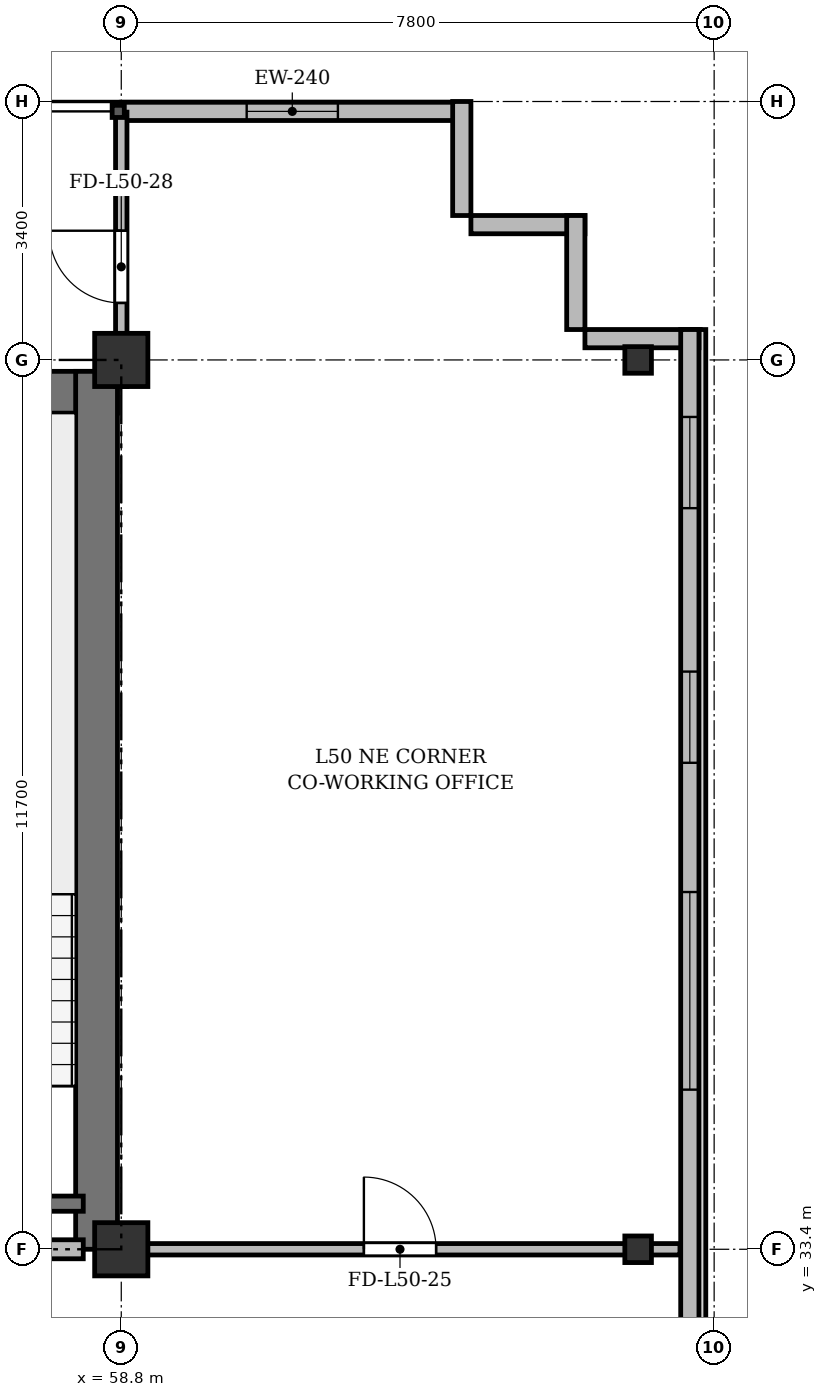
"""IFC4 building model, lengths in metres.
Left out: names, types, materials, properties, quantities, classifications, styles, units other than length and angle.
Written with IfcOpenShell. Run it as: python <this file> out.ifc"""

import sys

from ifc_helpers import new_model, si_unit, direction, frame, frame_2d, origin, origin_2d, place, context, subcontext, project, spatial, rectangle, i_section, extrude, source, transform, mapped, element, fill, save


model = new_model("IFC4")
c1 = context("Model", 3, precision=1e-05, world=origin(), true_north=direction((0.0, 1.0)))
c2 = subcontext(c1, "Body", "Model", "MODEL_VIEW")
j1 = project(units=[si_unit("LENGTHUNIT", "METRE"), si_unit("PLANEANGLEUNIT", "RADIAN")], contexts=[c1])
p1 = place(None, origin())
s1 = spatial("IfcSite", under=j1, at=p1, CompositionType="ELEMENT")
p2 = place(p1, origin())
s2 = spatial("IfcBuilding", under=s1, at=p2, CompositionType="ELEMENT")
p3 = place(p2, frame((0.0, 0.0, 194.1)))
s3 = spatial("IfcBuildingStorey", under=s2, at=p3, CompositionType="ELEMENT", Elevation=194.1)
m1 = source(origin(), c2, "Body", "SweptSolid", [
    extrude(rectangle(XDim=0.7, YDim=0.7, at=origin_2d()), origin(), (0.0, 0.0, 1.0), 3.6),
])
for number, where, z_axis, x_axis in (
    (1, (58.8, 33.4, 0.0), (0.0, 0.0, 1.0), (1.0, 0.0, 0.0)),
    (2, (58.8, 45.1, 0.0), (0.0, 0.0, 1.0), (1.0, 0.0, 0.0)),
):
    element("IfcColumn", number, at=place(p3, frame(where, z_axis=z_axis, x_axis=x_axis)), inside=s3, PredefinedType="COLUMN", context=c2, shape_type="MappedRepresentation", body=[
        mapped(m1, transform((0.0, 0.0, 0.0), x_axis=(1.0, 0.0, 0.0), y_axis=(0.0, 1.0, 0.0), z_axis=(0.0, 0.0, 1.0), scale=1.0)),
    ])
m2 = source(origin(), c2, "Body", "SweptSolid", [
    extrude(i_section(OverallWidth=0.35, OverallDepth=0.35, WebThickness=0.018, FlangeThickness=0.028, at=origin_2d()), origin(), (0.0, 0.0, 1.0), 3.6),
])
for number, where, z_axis, x_axis in (
    (3, (65.6, 33.4, 0.0), (0.0, 0.0, 1.0), (1.0, 0.0, 0.0)),
    (4, (65.6, 45.1, 0.0), (0.0, 0.0, 1.0), (1.0, 0.0, 0.0)),
):
    element("IfcColumn", number, at=place(p3, frame(where, z_axis=z_axis, x_axis=x_axis)), inside=s3, PredefinedType="COLUMN", context=c2, shape_type="MappedRepresentation", body=[
        mapped(m2, transform((0.0, 0.0, 0.0), x_axis=(1.0, 0.0, 0.0), y_axis=(0.0, 1.0, 0.0), z_axis=(0.0, 0.0, 1.0), scale=1.0)),
    ])
p4 = place(p3, frame((58.8, 48.37, 0.0), z_axis=(0.0, 0.0, 1.0), x_axis=(1.0, 0.0, 0.0)))
e5 = element("IfcWall", 5, at=p4, inside=s3, PredefinedType="SOLIDWALL", context=c2, shape_type="SweptSolid", body=[
    extrude(rectangle(XDim=4.5, YDim=0.24, at=frame_2d((2.25, 0.0))), origin(), (0.0, 0.0, 1.0), 3.36),
])
p5 = place(p4, frame((1.65, 0.0, 0.9)))
e6 = element("IfcOpeningElement", 6, at=p5, cuts=e5, PredefinedType="OPENING", context=c2, shape_type="SweptSolid", body=[
    extrude(rectangle(XDim=1.2, YDim=1.65, at=frame_2d((0.6, 0.825))), frame((0.0, 0.13, 0.0), z_axis=(0.0, -1.0, 0.0), x_axis=(1.0, 0.0, 0.0)), (0.0, 0.0, 1.0), 0.26),
])
for number, where, z_axis, x_axis in (
    (7, (63.28, 48.5, 0.0), (0.0, 0.0, 1.0), (0.0, -1.0, 0.0)),
    (8, (63.4, 46.88, 0.0), (0.0, 0.0, 1.0), (1.0, 0.0, 0.0)),
    (9, (64.78, 47.0, 0.0), (0.0, 0.0, 1.0), (0.0, -1.0, 0.0)),
    (10, (64.9, 45.38, 0.0), (0.0, 0.0, 1.0), (1.0, 0.0, 0.0)),
):
    element("IfcWall", number, at=place(p3, frame(where, z_axis=z_axis, x_axis=x_axis)), inside=s3, PredefinedType="SOLIDWALL", context=c2, shape_type="SweptSolid", body=[
        extrude(rectangle(XDim=1.5, YDim=0.24, at=frame_2d((0.75, 0.0))), origin(), (0.0, 0.0, 1.0), 3.36),
    ])
p6 = place(p3, frame((66.28, 45.5, 0.0), z_axis=(0.0, 0.0, 1.0), x_axis=(0.0, -1.0, 0.0)))
e11 = element("IfcWall", 11, at=p6, inside=s3, PredefinedType="SOLIDWALL", context=c2, shape_type="SweptSolid", body=[
    extrude(rectangle(XDim=39.1, YDim=0.24, at=frame_2d((19.55, 0.0))), origin(), (0.0, 0.0, 1.0), 3.36),
])
p7 = place(p6, frame((36.45, 0.0, 0.92)))
e12 = element("IfcOpeningElement", 12, at=p7, cuts=e11, PredefinedType="OPENING", context=c2, shape_type="SweptSolid", body=[
    extrude(rectangle(XDim=1.2, YDim=1.65, at=frame_2d((0.6, 0.825))), frame((0.0, 0.13, 0.0), z_axis=(0.0, -1.0, 0.0), x_axis=(1.0, 0.0, 0.0)), (0.0, 0.0, 1.0), 0.26),
])
p8 = place(p6, frame((32.8, 0.0, 0.92)))
e13 = element("IfcOpeningElement", 13, at=p8, cuts=e11, PredefinedType="OPENING", context=c2, shape_type="SweptSolid", body=[
    extrude(rectangle(XDim=2.6, YDim=1.9, at=frame_2d((1.3, 0.95))), frame((0.0, 0.13, 0.0), z_axis=(0.0, -1.0, 0.0), x_axis=(1.0, 0.0, 0.0)), (0.0, 0.0, 1.0), 0.26),
])
p9 = place(p6, frame((28.6, 0.0, 0.92)))
e14 = element("IfcOpeningElement", 14, at=p9, cuts=e11, PredefinedType="OPENING", context=c2, shape_type="SweptSolid", body=[
    extrude(rectangle(XDim=2.6, YDim=1.9, at=frame_2d((1.3, 0.95))), frame((0.0, 0.13, 0.0), z_axis=(0.0, -1.0, 0.0), x_axis=(1.0, 0.0, 0.0)), (0.0, 0.0, 1.0), 0.26),
])
p10 = place(p6, frame((21.4, 0.0, 0.92)))
e15 = element("IfcOpeningElement", 15, at=p10, cuts=e11, PredefinedType="OPENING", context=c2, shape_type="SweptSolid", body=[
    extrude(rectangle(XDim=2.6, YDim=1.9, at=frame_2d((1.3, 0.95))), frame((0.0, 0.13, 0.0), z_axis=(0.0, -1.0, 0.0), x_axis=(1.0, 0.0, 0.0)), (0.0, 0.0, 1.0), 0.26),
])
p11 = place(p6, frame((7.4, 0.0, 0.92)))
e16 = element("IfcOpeningElement", 16, at=p11, cuts=e11, PredefinedType="OPENING", context=c2, shape_type="SweptSolid", body=[
    extrude(rectangle(XDim=2.6, YDim=1.9, at=frame_2d((1.3, 0.95))), frame((0.0, 0.13, 0.0), z_axis=(0.0, -1.0, 0.0), x_axis=(1.0, 0.0, 0.0)), (0.0, 0.0, 1.0), 0.26),
])
p12 = place(p6, frame((4.5, 0.0, 0.92)))
e17 = element("IfcOpeningElement", 17, at=p12, cuts=e11, PredefinedType="OPENING", context=c2, shape_type="SweptSolid", body=[
    extrude(rectangle(XDim=1.2, YDim=1.65, at=frame_2d((0.6, 0.825))), frame((0.0, 0.13, 0.0), z_axis=(0.0, -1.0, 0.0), x_axis=(1.0, 0.0, 0.0)), (0.0, 0.0, 1.0), 0.26),
])
p13 = place(p6, frame((1.15, 0.0, 0.92)))
e18 = element("IfcOpeningElement", 18, at=p13, cuts=e11, PredefinedType="OPENING", context=c2, shape_type="SweptSolid", body=[
    extrude(rectangle(XDim=1.2, YDim=1.65, at=frame_2d((0.6, 0.825))), frame((0.0, 0.13, 0.0), z_axis=(0.0, -1.0, 0.0), x_axis=(1.0, 0.0, 0.0)), (0.0, 0.0, 1.0), 0.26),
])
p14 = place(p3, frame((15.65, 44.675, 0.0), z_axis=(0.0, 0.0, 1.0), x_axis=(1.0, 0.0, 0.0)))
e19 = element("IfcWall", 19, at=p14, inside=s3, PredefinedType="SHEAR", context=c2, shape_type="SweptSolid", body=[
    extrude(rectangle(XDim=43.1, YDim=0.55, at=frame_2d((21.55, 0.0))), origin(), (0.0, 0.0, 1.0), 3.36),
])
p15 = place(p3, frame((58.475, 33.4, 0.0), z_axis=(0.0, 0.0, 1.0), x_axis=(0.0, 1.0, 0.0)))
e20 = element("IfcWall", 20, at=p15, inside=s3, PredefinedType="SHEAR", context=c2, shape_type="SweptSolid", body=[
    extrude(rectangle(XDim=11.55, YDim=0.55, at=frame_2d((5.775, 0.0))), origin(), (0.0, 0.0, 1.0), 3.36),
])
p16 = place(p3, frame((54.9, 34.0, 0.0), z_axis=(0.0, 0.0, 1.0), x_axis=(1.0, 0.0, 0.0)))
e21 = element("IfcWall", 21, at=p16, inside=s3, PredefinedType="SHEAR", context=c2, shape_type="SweptSolid", body=[
    extrude(rectangle(XDim=3.4, YDim=0.2, at=frame_2d((1.7, 0.0))), origin(), (0.0, 0.0, 1.0), 3.36),
])
p17 = place(p3, frame((47.15, 33.4, 0.0), z_axis=(0.0, 0.0, 1.0), x_axis=(1.0, 0.0, 0.0)))
e22 = element("IfcWall", 22, at=p17, inside=s3, PredefinedType="PARTITIONING", context=c2, shape_type="SweptSolid", body=[
    extrude(rectangle(XDim=11.15, YDim=0.25, at=frame_2d((5.575, 0.0))), origin(), (0.0, 0.0, 1.0), 2.91),
])
p18 = place(p17, frame((0.7, 0.0, 0.0)))
e23 = element("IfcOpeningElement", 23, at=p18, cuts=e22, PredefinedType="OPENING", context=c2, shape_type="SweptSolid", body=[
    extrude(rectangle(XDim=0.95, YDim=2.15, at=frame_2d((0.475, 1.075))), frame((0.0, 0.135, 0.0), z_axis=(0.0, -1.0, 0.0), x_axis=(1.0, 0.0, 0.0)), (0.0, 0.0, 1.0), 0.27),
])
p19 = place(p17, frame((6.0, 0.0, 0.0)))
e24 = element("IfcOpeningElement", 24, at=p19, cuts=e22, PredefinedType="OPENING", context=c2, shape_type="SweptSolid", body=[
    extrude(rectangle(XDim=1.2, YDim=2.15, at=frame_2d((0.6, 1.075))), frame((0.0, 0.135, 0.0), z_axis=(0.0, -1.0, 0.0), x_axis=(1.0, 0.0, 0.0)), (0.0, 0.0, 1.0), 0.27),
])
p20 = place(p3, frame((58.8, 33.4, 0.0), z_axis=(0.0, 0.0, 1.0), x_axis=(1.0, 0.0, 0.0)))
e25 = element("IfcWall", 25, at=p20, inside=s3, PredefinedType="PARTITIONING", context=c2, shape_type="SweptSolid", body=[
    extrude(rectangle(XDim=7.35, YDim=0.15, at=frame_2d((3.675, 0.0))), origin(), (0.0, 0.0, 1.0), 2.91),
])
p21 = place(p20, frame((3.192, 0.0, 0.0)))
e26 = element("IfcOpeningElement", 26, at=p21, cuts=e25, PredefinedType="OPENING", context=c2, shape_type="SweptSolid", body=[
    extrude(rectangle(XDim=0.95, YDim=2.15, at=frame_2d((0.475, 1.075))), frame((0.0, 0.085, 0.0), z_axis=(0.0, -1.0, 0.0), x_axis=(1.0, 0.0, 0.0)), (0.0, 0.0, 1.0), 0.17),
])
p22 = place(p3, frame((58.8, 44.75, 0.0), z_axis=(0.0, 0.0, 1.0), x_axis=(0.0, 1.0, 0.0)))
e27 = element("IfcWall", 27, at=p22, inside=s3, PredefinedType="PARTITIONING", context=c2, shape_type="SweptSolid", body=[
    extrude(rectangle(XDim=3.61, YDim=0.15, at=frame_2d((1.805, 0.0))), origin(), (0.0, 0.0, 1.0), 2.86),
])
p23 = place(p22, frame((1.1, 0.0, 0.0)))
e28 = element("IfcOpeningElement", 28, at=p23, cuts=e27, PredefinedType="OPENING", context=c2, shape_type="SweptSolid", body=[
    extrude(rectangle(XDim=0.95, YDim=2.15, at=frame_2d((0.475, 1.075))), frame((0.0, 0.085, 0.0), z_axis=(0.0, -1.0, 0.0), x_axis=(1.0, 0.0, 0.0)), (0.0, 0.0, 1.0), 0.17),
])
m3 = source(origin(), c2, "Body", "SweptSolid", [
    extrude(rectangle(XDim=1.2, YDim=1.65, at=frame_2d((0.6, 0.825))), frame((0.0, 0.03, 0.0), z_axis=(0.0, -1.0, 0.0), x_axis=(1.0, 0.0, 0.0)), (0.0, 0.0, 1.0), 0.06),
])
p24 = place(p5, origin())
e29 = element("IfcWindow", 29, at=p24, inside=s3, PartitioningType="SINGLE_PANEL", PredefinedType="WINDOW", context=c2, shape_type="MappedRepresentation", body=[
    mapped(m3, transform((0.0, 0.0, 0.0), x_axis=(1.0, 0.0, 0.0), y_axis=(0.0, 1.0, 0.0), z_axis=(0.0, 0.0, 1.0), scale=1.0)),
])
fill(e6, e29)
m4 = source(origin(), c2, "Body", "SweptSolid", [
    extrude(rectangle(XDim=2.6, YDim=1.9, at=frame_2d((1.3, 0.95))), frame((0.0, 0.03, 0.0), z_axis=(0.0, -1.0, 0.0), x_axis=(1.0, 0.0, 0.0)), (0.0, 0.0, 1.0), 0.06),
])
p25 = place(p11, origin())
e30 = element("IfcWindow", 30, at=p25, inside=s3, PartitioningType="SINGLE_PANEL", PredefinedType="WINDOW", context=c2, shape_type="MappedRepresentation", body=[
    mapped(m4, transform((0.0, 0.0, 0.0), x_axis=(1.0, 0.0, 0.0), y_axis=(0.0, 1.0, 0.0), z_axis=(0.0, 0.0, 1.0), scale=1.0)),
])
fill(e16, e30)
p26 = place(p12, origin())
e31 = element("IfcWindow", 31, at=p26, inside=s3, PartitioningType="SINGLE_PANEL", PredefinedType="WINDOW", context=c2, shape_type="MappedRepresentation", body=[
    mapped(m3, transform((0.0, 0.0, 0.0), x_axis=(1.0, 0.0, 0.0), y_axis=(0.0, 1.0, 0.0), z_axis=(0.0, 0.0, 1.0), scale=1.0)),
])
fill(e17, e31)
p27 = place(p13, origin())
e32 = element("IfcWindow", 32, at=p27, inside=s3, PartitioningType="SINGLE_PANEL", PredefinedType="WINDOW", context=c2, shape_type="MappedRepresentation", body=[
    mapped(m3, transform((0.0, 0.0, 0.0), x_axis=(1.0, 0.0, 0.0), y_axis=(0.0, 1.0, 0.0), z_axis=(0.0, 0.0, 1.0), scale=1.0)),
])
fill(e18, e32)
m5 = source(origin(), c2, "Body", "SweptSolid", [
    extrude(rectangle(XDim=0.95, YDim=2.15, at=frame_2d((0.475, 1.075))), frame((0.0, 0.025, 0.0), z_axis=(0.0, -1.0, 0.0), x_axis=(1.0, 0.0, 0.0)), (0.0, 0.0, 1.0), 0.05),
])
p28 = place(p21, origin())
e33 = element("IfcDoor", 33, at=p28, inside=s3, OperationType="SINGLE_SWING_LEFT", PredefinedType="DOOR", context=c2, shape_type="MappedRepresentation", body=[
    mapped(m5, transform((0.0, 0.0, 0.0), x_axis=(1.0, 0.0, 0.0), y_axis=(0.0, 1.0, 0.0), z_axis=(0.0, 0.0, 1.0), scale=1.0)),
])
fill(e26, e33)
p29 = place(p23, origin())
e34 = element("IfcDoor", 34, at=p29, inside=s3, OperationType="SINGLE_SWING_RIGHT", PredefinedType="DOOR", context=c2, shape_type="MappedRepresentation", body=[
    mapped(m5, transform((0.0, 0.0, 0.0), x_axis=(1.0, 0.0, 0.0), y_axis=(0.0, 1.0, 0.0), z_axis=(0.0, 0.0, 1.0), scale=1.0)),
])
fill(e28, e34)
save(model, sys.argv[1])
